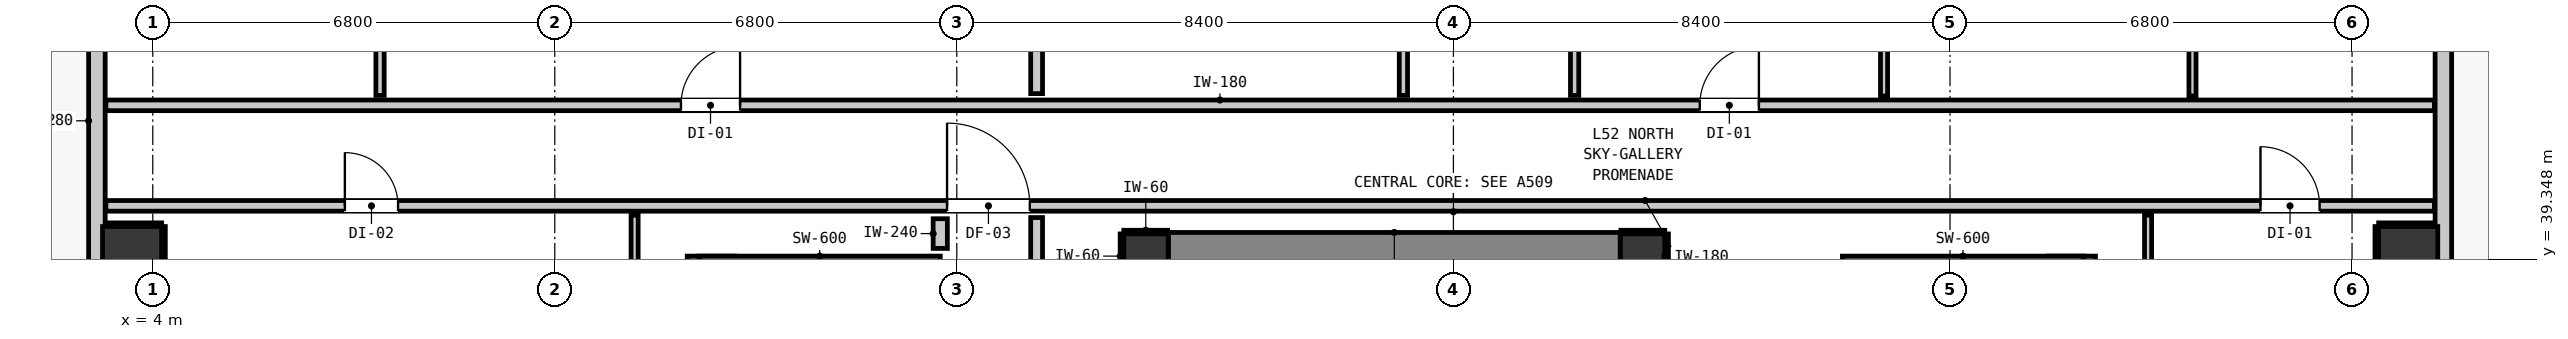
"""IFC4 building model, lengths in metres.
Left out: names, types, materials, properties, quantities, classifications, styles, units other than length and angle.
Written with IfcOpenShell. Run it as: python <this file> out.ifc"""

import sys

from ifc_helpers import new_model, si_unit, direction, frame, frame_2d, origin, origin_2d, place, context, subcontext, project, spatial, rectangle, extrude, element, fill, save


model = new_model("IFC4")
c1 = context("Model", 3, precision=1e-05, world=origin(), true_north=direction((0.0, 1.0)))
c2 = subcontext(c1, "Body", "Model", "MODEL_VIEW")
j1 = project(units=[si_unit("LENGTHUNIT", "METRE"), si_unit("PLANEANGLEUNIT", "RADIAN")], contexts=[c1])
p1 = place(None, origin())
s1 = spatial("IfcSite", under=j1, at=p1, CompositionType="ELEMENT")
p2 = place(p1, origin())
s2 = spatial("IfcBuilding", under=s1, at=p2, CompositionType="ELEMENT")
p3 = place(p2, frame((0.0, 0.0, 180.2)))
s3 = spatial("IfcBuildingStorey", under=s2, at=p3, CompositionType="ELEMENT", Elevation=180.2)
for number, where, z_axis, x_axis in (
    (1, (20.8, 39.4, 0.0), (0.0, 0.0, 1.0), (1.0, 0.0, 0.0)),
    (2, (29.2, 39.4, 0.0), (0.0, 0.0, 1.0), (1.0, 0.0, 0.0)),
):
    element("IfcColumn", number, at=place(p3, frame(where, z_axis=z_axis, x_axis=x_axis)), inside=s3, PredefinedType="COLUMN", context=c2, shape_type="SweptSolid", body=[
        extrude(rectangle(XDim=0.75, YDim=0.75, at=origin_2d()), origin(), (0.0, 0.0, 1.0), 3.32),
    ])
p4 = place(p3, frame((13.44, 31.08, 0.0), z_axis=(0.0, 0.0, 1.0), x_axis=(0.0, 1.0, 0.0)))
e3 = element("IfcWall", 3, at=p4, inside=s3, PredefinedType="SHEAR", context=c2, shape_type="SweptSolid", body=[
    extrude(rectangle(XDim=8.32, YDim=0.8, at=frame_2d((4.16, 0.0))), origin(), (0.0, 0.0, 1.0), 3.32),
])
p5 = place(p3, frame((13.24, 39.1, 0.0), z_axis=(0.0, 0.0, 1.0), x_axis=(1.0, 0.0, 0.0)))
e4 = element("IfcWall", 4, at=p5, inside=s3, PredefinedType="SHEAR", context=c2, shape_type="SweptSolid", body=[
    extrude(rectangle(XDim=4.08, YDim=0.6, at=frame_2d((2.04, 0.0))), origin(), (0.0, 0.0, 1.0), 3.32),
])
p6 = place(p3, frame((36.46, 31.08, 0.0), z_axis=(0.0, 0.0, 1.0), x_axis=(0.0, 1.0, 0.0)))
e5 = element("IfcWall", 5, at=p6, inside=s3, PredefinedType="SHEAR", context=c2, shape_type="SweptSolid", body=[
    extrude(rectangle(XDim=8.32, YDim=0.8, at=frame_2d((4.16, 0.0))), origin(), (0.0, 0.0, 1.0), 3.32),
])
p7 = place(p3, frame((32.58, 39.1, 0.0), z_axis=(0.0, 0.0, 1.0), x_axis=(1.0, 0.0, 0.0)))
e6 = element("IfcWall", 6, at=p7, inside=s3, PredefinedType="SHEAR", context=c2, shape_type="SweptSolid", body=[
    extrude(rectangle(XDim=4.08, YDim=0.6, at=frame_2d((2.04, 0.0))), origin(), (0.0, 0.0, 1.0), 3.32),
])
p8 = place(p3, frame((21.18, 39.4, 0.0), z_axis=(0.0, 0.0, 1.0), x_axis=(1.0, 0.0, 0.0)))
e7 = element("IfcWall", 7, at=p8, inside=s3, PredefinedType="SHEAR", context=c2, shape_type="SweptSolid", body=[
    extrude(rectangle(XDim=7.64, YDim=0.8, at=frame_2d((3.82, 0.0))), origin(), (0.0, 0.0, 1.0), 3.32),
])
for number, where, z_axis, x_axis in (
    (8, (3.65, 39.4, 0.0), (0.0, 0.0, 1.0), (1.0, 0.0, 0.0)),
    (9, (42.15, 39.4, 0.0), (0.0, 0.0, 1.0), (1.0, 0.0, 0.0)),
):
    element("IfcColumn", number, at=place(p3, frame(where, z_axis=z_axis, x_axis=x_axis)), inside=s3, PredefinedType="COLUMN", context=c2, shape_type="SweptSolid", body=[
        extrude(rectangle(XDim=1.0, YDim=1.0, at=origin_2d()), origin(), (0.0, 0.0, 1.0), 3.32),
    ])
p9 = place(p3, frame((3.055, 17.555, 0.0), z_axis=(0.0, 0.0, 1.0), x_axis=(0.0, 1.0, 0.0)))
e10 = element("IfcWall", 10, at=p9, inside=s3, PredefinedType="STANDARD", context=c2, shape_type="SweptSolid", body=[
    extrude(rectangle(XDim=32.29, YDim=0.28, at=frame_2d((16.145, 0.0))), origin(), (0.0, 0.0, 1.0), 3.08),
])
p10 = place(p9, frame((8.625, 0.0, 0.0)))
e11 = element("IfcOpeningElement", 11, at=p10, cuts=e10, PredefinedType="OPENING", context=c2, shape_type="SweptSolid", body=[
    extrude(rectangle(XDim=1.0, YDim=2.15, at=frame_2d((0.5, 1.075))), frame((0.0, 0.15, 0.0), z_axis=(0.0, -1.0, 0.0), x_axis=(1.0, 0.0, 0.0)), (0.0, 0.0, 1.0), 0.3),
])
p11 = place(p9, frame((30.322, 0.0, 0.85)))
e12 = element("IfcOpeningElement", 12, at=p11, cuts=e10, PredefinedType="OPENING", context=c2, shape_type="SweptSolid", body=[
    extrude(rectangle(XDim=0.9, YDim=1.5, at=frame_2d((0.45, 0.75))), frame((0.0, 0.15, 0.0), z_axis=(0.0, -1.0, 0.0), x_axis=(1.0, 0.0, 0.0)), (0.0, 0.0, 1.0), 0.3),
])
p12 = place(p9, frame((10.785, 0.0, 0.85)))
e13 = element("IfcOpeningElement", 13, at=p12, cuts=e10, PredefinedType="OPENING", context=c2, shape_type="SweptSolid", body=[
    extrude(rectangle(XDim=0.9, YDim=1.5, at=frame_2d((0.45, 0.75))), frame((0.0, 0.15, 0.0), z_axis=(0.0, -1.0, 0.0), x_axis=(1.0, 0.0, 0.0)), (0.0, 0.0, 1.0), 0.3),
])
p13 = place(p9, frame((17.045, 0.0, 0.85)))
e14 = element("IfcOpeningElement", 14, at=p13, cuts=e10, PredefinedType="OPENING", context=c2, shape_type="SweptSolid", body=[
    extrude(rectangle(XDim=0.9, YDim=1.5, at=frame_2d((0.45, 0.75))), frame((0.0, 0.15, 0.0), z_axis=(0.0, -1.0, 0.0), x_axis=(1.0, 0.0, 0.0)), (0.0, 0.0, 1.0), 0.3),
])
p14 = place(p3, frame((42.745, 49.845, 0.0), z_axis=(0.0, 0.0, 1.0), x_axis=(0.0, -1.0, 0.0)))
e15 = element("IfcWall", 15, at=p14, inside=s3, PredefinedType="STANDARD", context=c2, shape_type="SweptSolid", body=[
    extrude(rectangle(XDim=32.29, YDim=0.28, at=frame_2d((16.145, 0.0))), origin(), (0.0, 0.0, 1.0), 3.08),
])
p15 = place(p14, frame((0.904, 0.0, 0.0)))
e16 = element("IfcOpeningElement", 16, at=p15, cuts=e15, PredefinedType="OPENING", context=c2, shape_type="SweptSolid", body=[
    extrude(rectangle(XDim=1.0, YDim=2.15, at=frame_2d((0.5, 1.075))), frame((0.0, 0.15, 0.0), z_axis=(0.0, -1.0, 0.0), x_axis=(1.0, 0.0, 0.0)), (0.0, 0.0, 1.0), 0.3),
])
p16 = place(p14, frame((5.02, 0.0, 0.85)))
e17 = element("IfcOpeningElement", 17, at=p16, cuts=e15, PredefinedType="OPENING", context=c2, shape_type="SweptSolid", body=[
    extrude(rectangle(XDim=0.9, YDim=1.5, at=frame_2d((0.45, 0.75))), frame((0.0, 0.15, 0.0), z_axis=(0.0, -1.0, 0.0), x_axis=(1.0, 0.0, 0.0)), (0.0, 0.0, 1.0), 0.3),
])
p17 = place(p14, frame((23.045, 0.0, 0.85)))
e18 = element("IfcOpeningElement", 18, at=p17, cuts=e15, PredefinedType="OPENING", context=c2, shape_type="SweptSolid", body=[
    extrude(rectangle(XDim=0.9, YDim=1.5, at=frame_2d((0.45, 0.75))), frame((0.0, 0.15, 0.0), z_axis=(0.0, -1.0, 0.0), x_axis=(1.0, 0.0, 0.0)), (0.0, 0.0, 1.0), 0.3),
])
p18 = place(p14, frame((12.253, 0.0, 0.85)))
e19 = element("IfcOpeningElement", 19, at=p18, cuts=e15, PredefinedType="OPENING", context=c2, shape_type="SweptSolid", body=[
    extrude(rectangle(XDim=0.9, YDim=1.5, at=frame_2d((0.45, 0.75))), frame((0.0, 0.15, 0.0), z_axis=(0.0, -1.0, 0.0), x_axis=(1.0, 0.0, 0.0)), (0.0, 0.0, 1.0), 0.3),
])
p19 = place(p3, frame((3.207, 40.25, 0.0), z_axis=(0.0, 0.0, 1.0), x_axis=(1.0, 0.0, 0.0)))
e20 = element("IfcWall", 20, at=p19, inside=s3, PredefinedType="PARTITIONING", context=c2, shape_type="SweptSolid", body=[
    extrude(rectangle(XDim=39.386, YDim=0.18, at=frame_2d((19.693, 0.0))), origin(), (0.0, 0.0, 1.0), 3.08),
])
p20 = place(p19, frame((14.228, 0.0, 0.0)))
e21 = element("IfcOpeningElement", 21, at=p20, cuts=e20, PredefinedType="OPENING", context=c2, shape_type="SweptSolid", body=[
    extrude(rectangle(XDim=1.4, YDim=2.15, at=frame_2d((0.7, 1.075))), frame((0.0, 0.1, 0.0), z_axis=(0.0, -1.0, 0.0), x_axis=(1.0, 0.0, 0.0)), (0.0, 0.0, 1.0), 0.2),
])
p21 = place(p19, frame((4.042, 0.0, 0.0)))
e22 = element("IfcOpeningElement", 22, at=p21, cuts=e20, PredefinedType="OPENING", context=c2, shape_type="SweptSolid", body=[
    extrude(rectangle(XDim=0.9, YDim=2.1, at=frame_2d((0.45, 1.05))), frame((0.0, 0.1, 0.0), z_axis=(0.0, -1.0, 0.0), x_axis=(1.0, 0.0, 0.0)), (0.0, 0.0, 1.0), 0.2),
])
p22 = place(p19, frame((36.444, 0.0, 0.0)))
e23 = element("IfcOpeningElement", 23, at=p22, cuts=e20, PredefinedType="OPENING", context=c2, shape_type="SweptSolid", body=[
    extrude(rectangle(XDim=1.0, YDim=2.15, at=frame_2d((0.5, 1.075))), frame((0.0, 0.1, 0.0), z_axis=(0.0, -1.0, 0.0), x_axis=(1.0, 0.0, 0.0)), (0.0, 0.0, 1.0), 0.2),
])
p23 = place(p3, frame((3.207, 41.95, 0.0), z_axis=(0.0, 0.0, 1.0), x_axis=(1.0, 0.0, 0.0)))
e24 = element("IfcWall", 24, at=p23, inside=s3, PredefinedType="PARTITIONING", context=c2, shape_type="SweptSolid", body=[
    extrude(rectangle(XDim=39.386, YDim=0.18, at=frame_2d((19.693, 0.0))), origin(), (0.0, 0.0, 1.0), 3.08),
])
p24 = place(p23, frame((9.727, 0.0, 0.0)))
e25 = element("IfcOpeningElement", 25, at=p24, cuts=e24, PredefinedType="OPENING", context=c2, shape_type="SweptSolid", body=[
    extrude(rectangle(XDim=1.0, YDim=2.15, at=frame_2d((0.5, 1.075))), frame((0.0, 0.1, 0.0), z_axis=(0.0, -1.0, 0.0), x_axis=(1.0, 0.0, 0.0)), (0.0, 0.0, 1.0), 0.2),
])
p25 = place(p23, frame((26.96, 0.0, 0.0)))
e26 = element("IfcOpeningElement", 26, at=p25, cuts=e24, PredefinedType="OPENING", context=c2, shape_type="SweptSolid", body=[
    extrude(rectangle(XDim=1.0, YDim=2.15, at=frame_2d((0.5, 1.075))), frame((0.0, 0.1, 0.0), z_axis=(0.0, -1.0, 0.0), x_axis=(1.0, 0.0, 0.0)), (0.0, 0.0, 1.0), 0.2),
])
p26 = place(p3, frame((17.32, 39.53, 0.0), z_axis=(0.0, 0.0, 1.0), x_axis=(0.0, 1.0, 0.0)))
e27 = element("IfcWall", 27, at=p26, inside=s3, PredefinedType="PARTITIONING", context=c2, shape_type="SweptSolid", body=[
    extrude(rectangle(XDim=0.502, YDim=0.24, at=frame_2d((0.251, 0.0))), origin(), (0.0, 0.0, 1.0), 3.08),
])
p27 = place(p3, frame((18.95, 38.918, 0.0), z_axis=(0.0, 0.0, 1.0), x_axis=(0.0, 1.0, 0.0)))
e28 = element("IfcWall", 28, at=p27, inside=s3, PredefinedType="PARTITIONING", context=c2, shape_type="SweptSolid", body=[
    extrude(rectangle(XDim=1.134, YDim=0.2, at=frame_2d((0.567, 0.0))), origin(), (0.0, 0.0, 1.0), 3.08),
])
p28 = place(p3, frame((18.95, 42.148, 0.0), z_axis=(0.0, 0.0, 1.0), x_axis=(0.0, 1.0, 0.0)))
e29 = element("IfcWall", 29, at=p28, inside=s3, PredefinedType="PARTITIONING", context=c2, shape_type="SweptSolid", body=[
    extrude(rectangle(XDim=4.474, YDim=0.2, at=frame_2d((2.237, 0.0))), origin(), (0.0, 0.0, 1.0), 3.08),
])
p29 = place(p28, frame((1.777, 0.0, 0.0)))
e30 = element("IfcOpeningElement", 30, at=p29, cuts=e29, PredefinedType="OPENING", context=c2, shape_type="SweptSolid", body=[
    extrude(rectangle(XDim=0.9, YDim=2.1, at=frame_2d((0.45, 1.05))), frame((0.0, 0.11, 0.0), z_axis=(0.0, -1.0, 0.0), x_axis=(1.0, 0.0, 0.0)), (0.0, 0.0, 1.0), 0.22),
])
p30 = place(p3, frame((7.844, 42.118, 0.0), z_axis=(0.0, 0.0, 1.0), x_axis=(0.0, 1.0, 0.0)))
e31 = element("IfcWall", 31, at=p30, inside=s3, PredefinedType="PARTITIONING", context=c2, shape_type="SweptSolid", body=[
    extrude(rectangle(XDim=4.534, YDim=0.14, at=frame_2d((2.267, 0.0))), origin(), (0.0, 0.0, 1.0), 3.08),
])
p31 = place(p30, frame((1.827, 0.0, 0.0)))
e32 = element("IfcOpeningElement", 32, at=p31, cuts=e31, PredefinedType="OPENING", context=c2, shape_type="SweptSolid", body=[
    extrude(rectangle(XDim=0.86, YDim=2.02, at=frame_2d((0.43, 1.01))), frame((0.0, 0.08, 0.0), z_axis=(0.0, -1.0, 0.0), x_axis=(1.0, 0.0, 0.0)), (0.0, 0.0, 1.0), 0.16),
])
p32 = place(p3, frame((25.154, 42.118, 0.0), z_axis=(0.0, 0.0, 1.0), x_axis=(0.0, 1.0, 0.0)))
e33 = element("IfcWall", 33, at=p32, inside=s3, PredefinedType="PARTITIONING", context=c2, shape_type="SweptSolid", body=[
    extrude(rectangle(XDim=4.534, YDim=0.14, at=frame_2d((2.267, 0.0))), origin(), (0.0, 0.0, 1.0), 3.08),
])
p33 = place(p3, frame((28.05, 42.118, 0.0), z_axis=(0.0, 0.0, 1.0), x_axis=(0.0, 1.0, 0.0)))
e34 = element("IfcWall", 34, at=p33, inside=s3, PredefinedType="PARTITIONING", context=c2, shape_type="SweptSolid", body=[
    extrude(rectangle(XDim=4.534, YDim=0.14, at=frame_2d((2.267, 0.0))), origin(), (0.0, 0.0, 1.0), 3.08),
])
p34 = place(p33, frame((1.84, 0.0, 0.0)))
e35 = element("IfcOpeningElement", 35, at=p34, cuts=e34, PredefinedType="OPENING", context=c2, shape_type="SweptSolid", body=[
    extrude(rectangle(XDim=0.86, YDim=2.02, at=frame_2d((0.43, 1.01))), frame((0.0, 0.08, 0.0), z_axis=(0.0, -1.0, 0.0), x_axis=(1.0, 0.0, 0.0)), (0.0, 0.0, 1.0), 0.16),
])
p35 = place(p3, frame((12.15, 30.838, 0.0), z_axis=(0.0, 0.0, 1.0), x_axis=(0.0, 1.0, 0.0)))
e36 = element("IfcWall", 36, at=p35, inside=s3, PredefinedType="PARTITIONING", context=c2, shape_type="SweptSolid", body=[
    extrude(rectangle(XDim=9.254, YDim=0.12, at=frame_2d((4.627, 0.0))), origin(), (0.0, 0.0, 1.0), 3.08),
])
p36 = place(p3, frame((33.284, 42.108, 0.0), z_axis=(0.0, 0.0, 1.0), x_axis=(0.0, 1.0, 0.0)))
e37 = element("IfcWall", 37, at=p36, inside=s3, PredefinedType="PARTITIONING", context=c2, shape_type="SweptSolid", body=[
    extrude(rectangle(XDim=4.554, YDim=0.12, at=frame_2d((2.277, 0.0))), origin(), (0.0, 0.0, 1.0), 3.08),
])
p37 = place(p36, frame((1.83, 0.0, 0.0)))
e38 = element("IfcOpeningElement", 38, at=p37, cuts=e37, PredefinedType="OPENING", context=c2, shape_type="SweptSolid", body=[
    extrude(rectangle(XDim=0.9, YDim=2.1, at=frame_2d((0.45, 1.05))), frame((0.0, 0.07, 0.0), z_axis=(0.0, -1.0, 0.0), x_axis=(1.0, 0.0, 0.0)), (0.0, 0.0, 1.0), 0.14),
])
p38 = place(p3, frame((37.75, 35.422, 0.0), z_axis=(0.0, 0.0, 1.0), x_axis=(0.0, 1.0, 0.0)))
e39 = element("IfcWall", 39, at=p38, inside=s3, PredefinedType="PARTITIONING", context=c2, shape_type="SweptSolid", body=[
    extrude(rectangle(XDim=4.67, YDim=0.12, at=frame_2d((2.335, 0.0))), origin(), (0.0, 0.0, 1.0), 3.08),
])
p39 = place(p3, frame((38.501, 42.108, 0.0), z_axis=(0.0, 0.0, 1.0), x_axis=(0.0, 1.0, 0.0)))
e40 = element("IfcWall", 40, at=p39, inside=s3, PredefinedType="PARTITIONING", context=c2, shape_type="SweptSolid", body=[
    extrude(rectangle(XDim=4.554, YDim=0.12, at=frame_2d((2.277, 0.0))), origin(), (0.0, 0.0, 1.0), 2.565),
])
p40 = place(p39, frame((1.817, 0.0, 0.0)))
e41 = element("IfcOpeningElement", 41, at=p40, cuts=e40, PredefinedType="OPENING", context=c2, shape_type="SweptSolid", body=[
    extrude(rectangle(XDim=0.9, YDim=2.1, at=frame_2d((0.45, 1.05))), frame((0.0, 0.07, 0.0), z_axis=(0.0, -1.0, 0.0), x_axis=(1.0, 0.0, 0.0)), (0.0, 0.0, 1.0), 0.14),
])
p41 = place(p3, frame((20.425, 39.807, 0.0), z_axis=(0.0, 0.0, 1.0), x_axis=(1.0, 0.0, 0.0)))
e42 = element("IfcWall", 42, at=p41, inside=s3, PredefinedType="PARTITIONING", context=c2, shape_type="SweptSolid", body=[
    extrude(rectangle(XDim=0.742, YDim=0.06, at=frame_2d((0.371, 0.0))), origin(), (0.0, 0.0, 1.0), 1.45),
])
p42 = place(p3, frame((20.393, 39.025, 0.0), z_axis=(0.0, 0.0, 1.0), x_axis=(0.0, 1.0, 0.0)))
e43 = element("IfcWall", 43, at=p42, inside=s3, PredefinedType="PARTITIONING", context=c2, shape_type="SweptSolid", body=[
    extrude(rectangle(XDim=0.75, YDim=0.06, at=frame_2d((0.375, 0.0))), origin(), (0.0, 0.0, 1.0), 1.45),
])
p43 = place(p3, frame((28.833, 39.807, 0.0), z_axis=(0.0, 0.0, 1.0), x_axis=(1.0, 0.0, 0.0)))
e44 = element("IfcWall", 44, at=p43, inside=s3, PredefinedType="PARTITIONING", context=c2, shape_type="SweptSolid", body=[
    extrude(rectangle(XDim=0.742, YDim=0.06, at=frame_2d((0.371, 0.0))), origin(), (0.0, 0.0, 1.0), 1.45),
])
p44 = place(p3, frame((29.607, 39.025, 0.0), z_axis=(0.0, 0.0, 1.0), x_axis=(0.0, 1.0, 0.0)))
e45 = element("IfcWall", 45, at=p44, inside=s3, PredefinedType="PARTITIONING", context=c2, shape_type="SweptSolid", body=[
    extrude(rectangle(XDim=0.75, YDim=0.06, at=frame_2d((0.375, 0.0))), origin(), (0.0, 0.0, 1.0), 1.45),
])
p45 = place(p3, frame((3.21, 39.932, 0.0), z_axis=(0.0, 0.0, 1.0), x_axis=(1.0, 0.0, 0.0)))
e46 = element("IfcWall", 46, at=p45, inside=s3, PredefinedType="PARTITIONING", context=c2, shape_type="SweptSolid", body=[
    extrude(rectangle(XDim=0.94, YDim=0.06, at=frame_2d((0.47, 0.0))), origin(), (0.0, 0.0, 1.0), 1.45),
])
p46 = place(p3, frame((4.182, 38.9, 0.0), z_axis=(0.0, 0.0, 1.0), x_axis=(0.0, 1.0, 0.0)))
e47 = element("IfcWall", 47, at=p46, inside=s3, PredefinedType="PARTITIONING", context=c2, shape_type="SweptSolid", body=[
    extrude(rectangle(XDim=1.0, YDim=0.06, at=frame_2d((0.5, 0.0))), origin(), (0.0, 0.0, 1.0), 1.45),
])
p47 = place(p3, frame((41.65, 39.932, 0.0), z_axis=(0.0, 0.0, 1.0), x_axis=(1.0, 0.0, 0.0)))
e48 = element("IfcWall", 48, at=p47, inside=s3, PredefinedType="PARTITIONING", context=c2, shape_type="SweptSolid", body=[
    extrude(rectangle(XDim=0.94, YDim=0.06, at=frame_2d((0.47, 0.0))), origin(), (0.0, 0.0, 1.0), 1.45),
])
p48 = place(p3, frame((41.618, 38.9, 0.0), z_axis=(0.0, 0.0, 1.0), x_axis=(0.0, 1.0, 0.0)))
e49 = element("IfcWall", 49, at=p48, inside=s3, PredefinedType="PARTITIONING", context=c2, shape_type="SweptSolid", body=[
    extrude(rectangle(XDim=1.0, YDim=0.06, at=frame_2d((0.5, 0.0))), origin(), (0.0, 0.0, 1.0), 1.45),
])
p49 = place(p20, origin())
e50 = element("IfcDoor", 50, at=p49, inside=s3, OperationType="SINGLE_SWING_LEFT", PredefinedType="DOOR", context=c2, shape_type="SweptSolid", body=[
    extrude(rectangle(XDim=1.4, YDim=2.15, at=frame_2d((0.7, 1.075))), frame((0.0, 0.025, 0.0), z_axis=(0.0, -1.0, 0.0), x_axis=(1.0, 0.0, 0.0)), (0.0, 0.0, 1.0), 0.05),
])
fill(e21, e50)
p50 = place(p24, origin())
e51 = element("IfcDoor", 51, at=p50, inside=s3, OperationType="SINGLE_SWING_RIGHT", PredefinedType="DOOR", context=c2, shape_type="SweptSolid", body=[
    extrude(rectangle(XDim=1.0, YDim=2.15, at=frame_2d((0.5, 1.075))), frame((0.0, 0.025, 0.0), z_axis=(0.0, -1.0, 0.0), x_axis=(1.0, 0.0, 0.0)), (0.0, 0.0, 1.0), 0.05),
])
fill(e25, e51)
p51 = place(p25, origin())
e52 = element("IfcDoor", 52, at=p51, inside=s3, OperationType="SINGLE_SWING_RIGHT", PredefinedType="DOOR", context=c2, shape_type="SweptSolid", body=[
    extrude(rectangle(XDim=1.0, YDim=2.15, at=frame_2d((0.5, 1.075))), frame((0.0, 0.025, 0.0), z_axis=(0.0, -1.0, 0.0), x_axis=(1.0, 0.0, 0.0)), (0.0, 0.0, 1.0), 0.05),
])
fill(e26, e52)
p52 = place(p21, origin())
e53 = element("IfcDoor", 53, at=p52, inside=s3, OperationType="SINGLE_SWING_LEFT", PredefinedType="DOOR", context=c2, shape_type="SweptSolid", body=[
    extrude(rectangle(XDim=0.9, YDim=2.1, at=frame_2d((0.45, 1.05))), frame((0.0, 0.025, 0.0), z_axis=(0.0, -1.0, 0.0), x_axis=(1.0, 0.0, 0.0)), (0.0, 0.0, 1.0), 0.05),
])
fill(e22, e53)
p53 = place(p22, origin())
e54 = element("IfcDoor", 54, at=p53, inside=s3, OperationType="SINGLE_SWING_LEFT", PredefinedType="DOOR", context=c2, shape_type="SweptSolid", body=[
    extrude(rectangle(XDim=1.0, YDim=2.15, at=frame_2d((0.5, 1.075))), frame((0.0, 0.025, 0.0), z_axis=(0.0, -1.0, 0.0), x_axis=(1.0, 0.0, 0.0)), (0.0, 0.0, 1.0), 0.05),
])
fill(e23, e54)
save(model, sys.argv[1])
